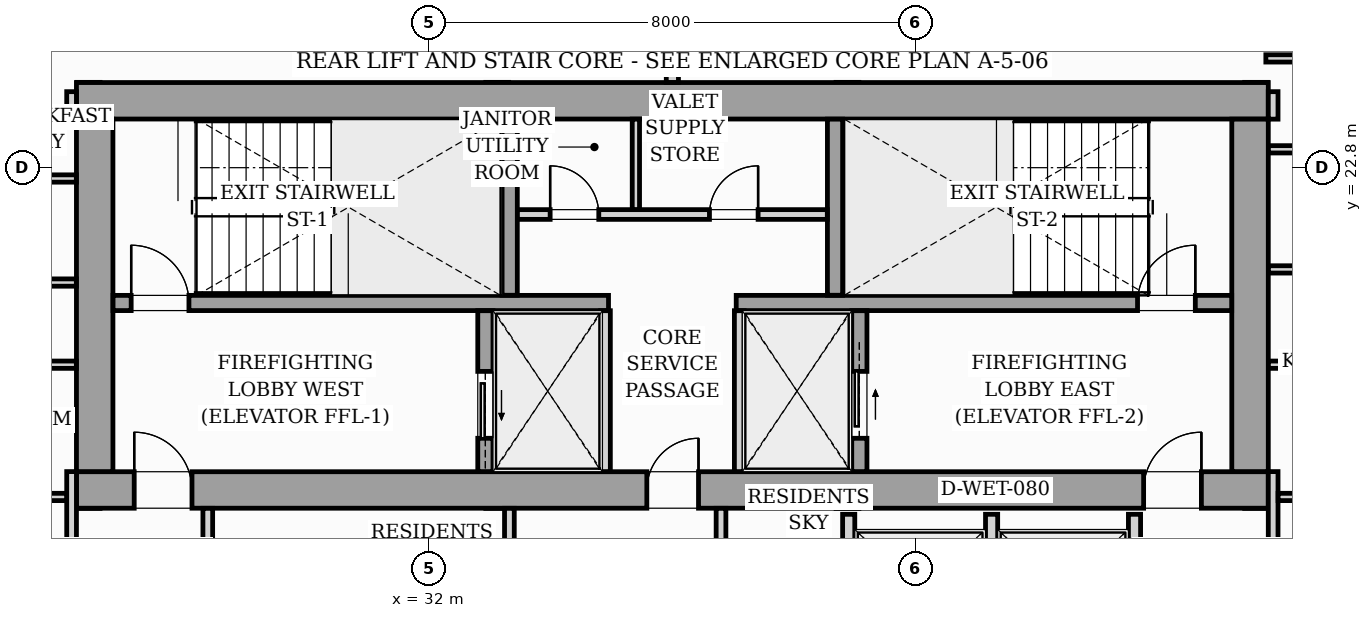
"""IFC4 building model, lengths in metres.
Left out: names, types, materials, properties, quantities, classifications, styles, units other than length and angle.
Written with IfcOpenShell. Run it as: python <this file> out.ifc"""

import sys

from ifc_helpers import new_model, si_unit, direction, frame, frame_2d, origin, origin_2d, place, context, subcontext, project, spatial, rectangle, i_section, extrude, source, transform, mapped, element, fill, save


model = new_model("IFC4")
c1 = context("Model", 3, precision=1e-05, world=origin(), true_north=direction((0.0, 1.0)))
c2 = subcontext(c1, "Body", "Model", "MODEL_VIEW")
j1 = project(units=[si_unit("LENGTHUNIT", "METRE"), si_unit("PLANEANGLEUNIT", "RADIAN")], contexts=[c1])
p1 = place(None, origin())
s1 = spatial("IfcSite", under=j1, at=p1, CompositionType="ELEMENT")
p2 = place(p1, origin())
s2 = spatial("IfcBuilding", under=s1, at=p2, CompositionType="ELEMENT")
p3 = place(p2, frame((0.0, 0.0, 195.4)))
s3 = spatial("IfcBuildingStorey", under=s2, at=p3, CompositionType="ELEMENT", Elevation=195.4)
m1 = source(origin(), c2, "Body", "SweptSolid", [
    extrude(i_section(OverallWidth=0.416, OverallDepth=0.446, WebThickness=0.039, FlangeThickness=0.063, FilletRadius=0.018, at=origin_2d()), origin(), (0.0, 0.0, 1.0), 3.196),
])
for number, where, z_axis, x_axis in (
    (1, (26.4, 17.4, 0.002), (0.0, 0.0, 1.0), (1.0, 0.0, 0.0)),
    (2, (33.12, 17.4, 0.002), (0.0, 0.0, 1.0), (1.0, 0.0, 0.0)),
    (3, (38.88, 17.4, 0.002), (0.0, 0.0, 1.0), (1.0, 0.0, 0.0)),
    (4, (45.6, 17.4, 0.002), (0.0, 0.0, 1.0), (1.0, 0.0, 0.0)),
    (5, (26.4, 24.0, 0.002), (0.0, 0.0, 1.0), (1.0, 0.0, 0.0)),
    (6, (33.12, 24.0, 0.002), (0.0, 0.0, 1.0), (1.0, 0.0, 0.0)),
    (7, (38.88, 24.0, 0.002), (0.0, 0.0, 1.0), (1.0, 0.0, 0.0)),
    (8, (45.6, 24.0, 0.002), (0.0, 0.0, 1.0), (1.0, 0.0, 0.0)),
):
    element("IfcColumn", number, at=place(p3, frame(where, z_axis=z_axis, x_axis=x_axis)), inside=s3, PredefinedType="PILASTER", context=c2, shape_type="MappedRepresentation", body=[
        mapped(m1, transform((0.0, 0.0, 0.0), scale=1.0)),
    ])
p4 = place(p3, frame((15.437, 24.324, 0.0), z_axis=(0.0, 0.0, 1.0), x_axis=(0.995395627913, 0.095851676732, 0.0)))
e9 = element("IfcWall", 9, at=p4, inside=s3, PredefinedType="STANDARD", context=c2, shape_type="SweptSolid", body=[
    extrude(rectangle(XDim=16.1, YDim=0.26, at=frame_2d((8.05, 0.0))), origin(), (0.0, 0.0, 1.0), 2.94),
])
p5 = place(p4, frame((6.147, 0.0, 0.0)))
e10 = element("IfcOpeningElement", 10, at=p5, cuts=e9, PredefinedType="OPENING", context=c2, shape_type="SweptSolid", body=[
    extrude(rectangle(XDim=1.8, YDim=2.06, at=frame_2d((0.9, 1.03))), frame((0.0, 0.14, 0.0), z_axis=(0.0, -1.0, 0.0), x_axis=(1.0, 0.0, 0.0)), (0.0, 0.0, 1.0), 0.28),
])
p6 = place(p4, frame((2.05, 0.0, 0.65)))
e11 = element("IfcOpeningElement", 11, at=p6, cuts=e9, PredefinedType="OPENING", context=c2, shape_type="SweptSolid", body=[
    extrude(rectangle(XDim=1.6, YDim=1.5, at=frame_2d((0.8, 0.75))), frame((0.0, 0.14, 0.0), z_axis=(0.0, -1.0, 0.0), x_axis=(1.0, 0.0, 0.0)), (0.0, 0.0, 1.0), 0.28),
])
p7 = place(p3, frame((26.2, 17.5, 0.0), z_axis=(0.0, 0.0, 1.0), x_axis=(1.0, 0.0, 0.0)))
e12 = element("IfcWall", 12, at=p7, inside=s3, PredefinedType="SHEAR", context=c2, shape_type="SweptSolid", body=[
    extrude(rectangle(XDim=19.6, YDim=0.6, at=frame_2d((9.8, 0.0))), origin(), (0.0, 0.0, 1.0), 3.2),
])
p8 = place(p7, frame((0.95, 0.0, 0.0)))
e13 = element("IfcOpeningElement", 13, at=p8, cuts=e12, PredefinedType="OPENING", context=c2, shape_type="SweptSolid", body=[
    extrude(rectangle(XDim=0.95, YDim=2.06, at=frame_2d((0.475, 1.03))), frame((0.0, 0.31, 0.0), z_axis=(0.0, -1.0, 0.0), x_axis=(1.0, 0.0, 0.0)), (0.0, 0.0, 1.0), 0.62),
])
p9 = place(p7, frame((9.38, 0.0, 0.0)))
e14 = element("IfcOpeningElement", 14, at=p9, cuts=e12, PredefinedType="OPENING", context=c2, shape_type="SweptSolid", body=[
    extrude(rectangle(XDim=0.85, YDim=2.0, at=frame_2d((0.425, 1.0))), frame((0.0, 0.31, 0.0), z_axis=(0.0, -1.0, 0.0), x_axis=(1.0, 0.0, 0.0)), (0.0, 0.0, 1.0), 0.62),
])
p10 = place(p7, frame((17.55, 0.0, 0.0)))
e15 = element("IfcOpeningElement", 15, at=p10, cuts=e12, PredefinedType="OPENING", context=c2, shape_type="SweptSolid", body=[
    extrude(rectangle(XDim=0.95, YDim=2.06, at=frame_2d((0.475, 1.03))), frame((0.0, 0.31, 0.0), z_axis=(0.0, -1.0, 0.0), x_axis=(1.0, 0.0, 0.0)), (0.0, 0.0, 1.0), 0.62),
])
p11 = place(p3, frame((26.2, 23.9, 0.0), z_axis=(0.0, 0.0, 1.0), x_axis=(1.0, 0.0, 0.0)))
e16 = element("IfcWall", 16, at=p11, inside=s3, PredefinedType="SHEAR", context=c2, shape_type="SweptSolid", body=[
    extrude(rectangle(XDim=19.6, YDim=0.6, at=frame_2d((9.8, 0.0))), origin(), (0.0, 0.0, 1.0), 3.2),
])
for number, where, z_axis, x_axis in (
    (17, (26.5, 17.802, 0.0), (0.0, 0.0, 1.0), (0.0, 1.0, 0.0)),
    (18, (45.5, 17.802, 0.0), (0.0, 0.0, 1.0), (0.0, 1.0, 0.0)),
):
    element("IfcWall", number, at=place(p3, frame(where, z_axis=z_axis, x_axis=x_axis)), inside=s3, PredefinedType="SHEAR", context=c2, shape_type="SweptSolid", body=[
        extrude(rectangle(XDim=5.796, YDim=0.6, at=frame_2d((2.898, 0.0))), origin(), (0.0, 0.0, 1.0), 3.2),
    ])
p12 = place(p3, frame((26.802, 20.575, 0.0), z_axis=(0.0, 0.0, 1.0), x_axis=(1.0, 0.0, 0.0)))
e19 = element("IfcWall", 19, at=p12, inside=s3, PredefinedType="SOLIDWALL", context=c2, shape_type="SweptSolid", body=[
    extrude(rectangle(XDim=8.148, YDim=0.25, at=frame_2d((4.074, 0.0))), origin(), (0.0, 0.0, 1.0), 3.2),
])
p13 = place(p12, frame((0.298, 0.0, 0.0)))
e20 = element("IfcOpeningElement", 20, at=p13, cuts=e19, PredefinedType="OPENING", context=c2, shape_type="SweptSolid", body=[
    extrude(rectangle(XDim=0.95, YDim=2.06, at=frame_2d((0.475, 1.03))), frame((0.0, 0.135, 0.0), z_axis=(0.0, -1.0, 0.0), x_axis=(1.0, 0.0, 0.0)), (0.0, 0.0, 1.0), 0.27),
])
p14 = place(p3, frame((37.05, 20.575, 0.0), z_axis=(0.0, 0.0, 1.0), x_axis=(1.0, 0.0, 0.0)))
e21 = element("IfcWall", 21, at=p14, inside=s3, PredefinedType="SOLIDWALL", context=c2, shape_type="SweptSolid", body=[
    extrude(rectangle(XDim=8.148, YDim=0.25, at=frame_2d((4.074, 0.0))), origin(), (0.0, 0.0, 1.0), 3.2),
])
p15 = place(p14, frame((6.6, 0.0, 0.0)))
e22 = element("IfcOpeningElement", 22, at=p15, cuts=e21, PredefinedType="OPENING", context=c2, shape_type="SweptSolid", body=[
    extrude(rectangle(XDim=0.95, YDim=2.06, at=frame_2d((0.475, 1.03))), frame((0.0, 0.135, 0.0), z_axis=(0.0, -1.0, 0.0), x_axis=(1.0, 0.0, 0.0)), (0.0, 0.0, 1.0), 0.27),
])
for number, where, z_axis, x_axis in (
    (23, (33.325, 20.702, 0.0), (0.0, 0.0, 1.0), (0.0, 1.0, 0.0)),
    (24, (38.675, 20.702, 0.0), (0.0, 0.0, 1.0), (0.0, 1.0, 0.0)),
):
    element("IfcWall", number, at=place(p3, frame(where, z_axis=z_axis, x_axis=x_axis)), inside=s3, PredefinedType="SOLIDWALL", context=c2, shape_type="SweptSolid", body=[
        extrude(rectangle(XDim=2.896, YDim=0.25, at=frame_2d((1.448, 0.0))), origin(), (0.0, 0.0, 1.0), 3.2),
    ])
p16 = place(p3, frame((32.925, 17.802, 0.0), z_axis=(0.0, 0.0, 1.0), x_axis=(0.0, 1.0, 0.0)))
e25 = element("IfcWall", 25, at=p16, inside=s3, PredefinedType="SOLIDWALL", context=c2, shape_type="SweptSolid", body=[
    extrude(rectangle(XDim=2.646, YDim=0.25, at=frame_2d((1.323, 0.0))), origin(), (0.0, 0.0, 1.0), 3.2),
])
p17 = place(p16, frame((0.548, 0.0, 0.0)))
e26 = element("IfcOpeningElement", 26, at=p17, cuts=e25, PredefinedType="OPENING", context=c2, shape_type="SweptSolid", body=[
    extrude(rectangle(XDim=1.1, YDim=2.08, at=frame_2d((0.55, 1.04))), frame((0.0, 0.135, 0.0), z_axis=(0.0, -1.0, 0.0), x_axis=(1.0, 0.0, 0.0)), (0.0, 0.0, 1.0), 0.27),
])
for number, where, z_axis, x_axis in (
    (27, (34.9, 17.802, 0.0), (0.0, 0.0, 1.0), (0.0, 1.0, 0.0)),
    (28, (37.1, 17.802, 0.0), (0.0, 0.0, 1.0), (0.0, 1.0, 0.0)),
):
    element("IfcWall", number, at=place(p3, frame(where, z_axis=z_axis, x_axis=x_axis)), inside=s3, PredefinedType="PARTITIONING", context=c2, shape_type="SweptSolid", body=[
        extrude(rectangle(XDim=2.646, YDim=0.16, at=frame_2d((1.323, 0.0))), origin(), (0.0, 0.0, 1.0), 2.94),
    ])
p18 = place(p3, frame((39.075, 17.802, 0.0), z_axis=(0.0, 0.0, 1.0), x_axis=(0.0, 1.0, 0.0)))
e29 = element("IfcWall", 29, at=p18, inside=s3, PredefinedType="SOLIDWALL", context=c2, shape_type="SweptSolid", body=[
    extrude(rectangle(XDim=2.646, YDim=0.25, at=frame_2d((1.323, 0.0))), origin(), (0.0, 0.0, 1.0), 3.2),
])
p19 = place(p18, frame((0.548, 0.0, 0.0)))
e30 = element("IfcOpeningElement", 30, at=p19, cuts=e29, PredefinedType="OPENING", context=c2, shape_type="SweptSolid", body=[
    extrude(rectangle(XDim=1.1, YDim=2.08, at=frame_2d((0.55, 1.04))), frame((0.0, 0.135, 0.0), z_axis=(0.0, -1.0, 0.0), x_axis=(1.0, 0.0, 0.0)), (0.0, 0.0, 1.0), 0.27),
])
p20 = place(p3, frame((33.452, 22.03, 0.0), z_axis=(0.0, 0.0, 1.0), x_axis=(1.0, 0.0, 0.0)))
e31 = element("IfcWall", 31, at=p20, inside=s3, PredefinedType="PARTITIONING", context=c2, shape_type="SweptSolid", body=[
    extrude(rectangle(XDim=5.096, YDim=0.16, at=frame_2d((2.548, 0.0))), origin(), (0.0, 0.0, 1.0), 2.94),
])
p21 = place(p20, frame((0.538, 0.0, 0.0)))
e32 = element("IfcOpeningElement", 32, at=p21, cuts=e31, PredefinedType="OPENING", context=c2, shape_type="SweptSolid", body=[
    extrude(rectangle(XDim=0.8, YDim=2.05, at=frame_2d((0.4, 1.025))), frame((0.0, 0.09, 0.0), z_axis=(0.0, -1.0, 0.0), x_axis=(1.0, 0.0, 0.0)), (0.0, 0.0, 1.0), 0.18),
])
p22 = place(p20, frame((3.158, 0.0, 0.0)))
e33 = element("IfcOpeningElement", 33, at=p22, cuts=e31, PredefinedType="OPENING", context=c2, shape_type="SweptSolid", body=[
    extrude(rectangle(XDim=0.8, YDim=2.05, at=frame_2d((0.4, 1.025))), frame((0.0, 0.09, 0.0), z_axis=(0.0, -1.0, 0.0), x_axis=(1.0, 0.0, 0.0)), (0.0, 0.0, 1.0), 0.18),
])
p23 = place(p3, frame((35.4, 22.112, 0.0), z_axis=(0.0, 0.0, 1.0), x_axis=(0.0, 1.0, 0.0)))
e34 = element("IfcWall", 34, at=p23, inside=s3, PredefinedType="PARTITIONING", context=c2, shape_type="SweptSolid", body=[
    extrude(rectangle(XDim=1.486, YDim=0.12, at=frame_2d((0.743, 0.0))), origin(), (0.0, 0.0, 1.0), 2.94),
])
for number, where, z_axis, x_axis in (
    (35, (38.9, 14.75, 0.0), (0.0, 0.0, 1.0), (0.0, 1.0, 0.0)),
    (36, (41.25, 14.75, 0.0), (0.0, 0.0, 1.0), (0.0, 1.0, 0.0)),
    (37, (43.6, 14.75, 0.0), (0.0, 0.0, 1.0), (0.0, 1.0, 0.0)),
):
    element("IfcWall", number, at=place(p3, frame(where, z_axis=z_axis, x_axis=x_axis)), inside=s3, PredefinedType="PARTITIONING", context=c2, shape_type="SweptSolid", body=[
        extrude(rectangle(XDim=2.35, YDim=0.2, at=frame_2d((1.175, 0.0))), origin(), (0.0, 0.0, 1.0), 2.94),
    ])
p24 = place(p3, frame((26.12, 13.442, 0.0), z_axis=(0.0, 0.0, 1.0), x_axis=(0.0, 1.0, 0.0)))
e38 = element("IfcWall", 38, at=p24, inside=s3, PredefinedType="PARTITIONING", context=c2, shape_type="SweptSolid", body=[
    extrude(rectangle(XDim=4.36, YDim=0.16, at=frame_2d((2.18, 0.0))), origin(), (0.0, 0.0, 1.0), 2.94),
])
p25 = place(p24, frame((0.493, 0.0, 0.0)))
e39 = element("IfcOpeningElement", 39, at=p25, cuts=e38, PredefinedType="OPENING", context=c2, shape_type="SweptSolid", body=[
    extrude(rectangle(XDim=0.95, YDim=2.06, at=frame_2d((0.475, 1.03))), frame((0.0, 0.09, 0.0), z_axis=(0.0, -1.0, 0.0), x_axis=(1.0, 0.0, 0.0)), (0.0, 0.0, 1.0), 0.18),
])
p26 = place(p3, frame((26.12, 23.598, 0.0), z_axis=(0.0, 0.0, 1.0), x_axis=(0.0, 1.0, 0.0)))
e40 = element("IfcWall", 40, at=p26, inside=s3, PredefinedType="PARTITIONING", context=c2, shape_type="SweptSolid", body=[
    extrude(rectangle(XDim=0.452, YDim=0.16, at=frame_2d((0.226, 0.0))), origin(), (0.0, 0.0, 1.0), 2.94),
])
p27 = place(p3, frame((45.88, 13.442, 0.0), z_axis=(0.0, 0.0, 1.0), x_axis=(0.0, 1.0, 0.0)))
e41 = element("IfcWall", 41, at=p27, inside=s3, PredefinedType="PARTITIONING", context=c2, shape_type="SweptSolid", body=[
    extrude(rectangle(XDim=4.36, YDim=0.16, at=frame_2d((2.18, 0.0))), origin(), (0.0, 0.0, 1.0), 2.94),
])
p28 = place(p27, frame((0.493, 0.0, 0.0)))
e42 = element("IfcOpeningElement", 42, at=p28, cuts=e41, PredefinedType="OPENING", context=c2, shape_type="SweptSolid", body=[
    extrude(rectangle(XDim=0.95, YDim=2.06, at=frame_2d((0.475, 1.03))), frame((0.0, 0.09, 0.0), z_axis=(0.0, -1.0, 0.0), x_axis=(1.0, 0.0, 0.0)), (0.0, 0.0, 1.0), 0.18),
])
p29 = place(p3, frame((45.88, 23.598, 0.0), z_axis=(0.0, 0.0, 1.0), x_axis=(0.0, 1.0, 0.0)))
e43 = element("IfcWall", 43, at=p29, inside=s3, PredefinedType="PARTITIONING", context=c2, shape_type="SweptSolid", body=[
    extrude(rectangle(XDim=0.452, YDim=0.16, at=frame_2d((0.226, 0.0))), origin(), (0.0, 0.0, 1.0), 2.94),
])
p30 = place(p3, frame((36.0, 24.202, 0.0), z_axis=(0.0, 0.0, 1.0), x_axis=(0.0, 1.0, 0.0)))
e44 = element("IfcWall", 44, at=p30, inside=s3, PredefinedType="PARTITIONING", context=c2, shape_type="SweptSolid", body=[
    extrude(rectangle(XDim=2.152, YDim=0.2, at=frame_2d((1.076, 0.0))), origin(), (0.0, 0.0, 1.0), 2.94),
])
p31 = place(p3, frame((23.782, 17.385, 0.0), z_axis=(0.0, 0.0, 1.0), x_axis=(1.0, 0.0, 0.0)))
e45 = element("IfcWall", 45, at=p31, inside=s3, PredefinedType="PARTITIONING", context=c2, shape_type="SweptSolid", body=[
    extrude(rectangle(XDim=2.256, YDim=0.12, at=frame_2d((1.128, 0.0))), origin(), (0.0, 0.0, 1.0), 2.281),
])
p32 = place(p3, frame((23.782, 19.56, 0.0), z_axis=(0.0, 0.0, 1.0), x_axis=(1.0, 0.0, 0.0)))
e46 = element("IfcWall", 46, at=p32, inside=s3, PredefinedType="PARTITIONING", context=c2, shape_type="SweptSolid", body=[
    extrude(rectangle(XDim=2.416, YDim=0.12, at=frame_2d((1.208, 0.0))), origin(), (0.0, 0.0, 1.0), 2.94),
])
p33 = place(p3, frame((14.608, 22.622, 0.0), z_axis=(0.0, 0.0, 1.0), x_axis=(1.0, 0.0, 0.0)))
e47 = element("IfcWall", 47, at=p33, inside=s3, PredefinedType="PARTITIONING", context=c2, shape_type="SweptSolid", body=[
    extrude(rectangle(XDim=11.59, YDim=0.12, at=frame_2d((5.795, 0.0))), origin(), (0.0, 0.0, 1.0), 2.94),
])
p34 = place(p33, frame((5.27, 0.0, 0.0)))
e48 = element("IfcOpeningElement", 48, at=p34, cuts=e47, PredefinedType="OPENING", context=c2, shape_type="SweptSolid", body=[
    extrude(rectangle(XDim=0.85, YDim=2.05, at=frame_2d((0.425, 1.025))), frame((0.0, 0.07, 0.0), z_axis=(0.0, -1.0, 0.0), x_axis=(1.0, 0.0, 0.0)), (0.0, 0.0, 1.0), 0.14),
])
p35 = place(p3, frame((13.334, 20.911, 0.0), z_axis=(0.0, 0.0, 1.0), x_axis=(1.0, 0.0, 0.0)))
e49 = element("IfcWall", 49, at=p35, inside=s3, PredefinedType="PARTITIONING", context=c2, shape_type="SweptSolid", body=[
    extrude(rectangle(XDim=12.864, YDim=0.12, at=frame_2d((6.432, 0.0))), origin(), (0.0, 0.0, 1.0), 2.94),
])
p36 = place(p35, frame((5.881, 0.0, 0.0)))
e50 = element("IfcOpeningElement", 50, at=p36, cuts=e49, PredefinedType="OPENING", context=c2, shape_type="SweptSolid", body=[
    extrude(rectangle(XDim=0.85, YDim=2.05, at=frame_2d((0.425, 1.025))), frame((0.0, 0.07, 0.0), z_axis=(0.0, -1.0, 0.0), x_axis=(1.0, 0.0, 0.0)), (0.0, 0.0, 1.0), 0.14),
])
p37 = place(p3, frame((45.962, 17.385, 0.0), z_axis=(0.0, 0.0, 1.0), x_axis=(1.0, 0.0, 0.0)))
e51 = element("IfcWall", 51, at=p37, inside=s3, PredefinedType="PARTITIONING", context=c2, shape_type="SweptSolid", body=[
    extrude(rectangle(XDim=2.256, YDim=0.12, at=frame_2d((1.128, 0.0))), origin(), (0.0, 0.0, 1.0), 2.281),
])
p38 = place(p3, frame((45.802, 19.56, 0.0), z_axis=(0.0, 0.0, 1.0), x_axis=(1.0, 0.0, 0.0)))
e52 = element("IfcWall", 52, at=p38, inside=s3, PredefinedType="PARTITIONING", context=c2, shape_type="SweptSolid", body=[
    extrude(rectangle(XDim=2.416, YDim=0.12, at=frame_2d((1.208, 0.0))), origin(), (0.0, 0.0, 1.0), 2.94),
])
p39 = place(p3, frame((45.76, 24.597, 0.0), z_axis=(0.0, 0.0, 1.0), x_axis=(1.0, 0.0, 0.0)))
e53 = element("IfcWall", 53, at=p39, inside=s3, PredefinedType="PARTITIONING", context=c2, shape_type="SweptSolid", body=[
    extrude(rectangle(XDim=18.294, YDim=0.12, at=frame_2d((9.147, 0.0))), origin(), (0.0, 0.0, 1.0), 2.94),
])
p40 = place(p39, frame((6.388, 0.0, 0.0)))
e54 = element("IfcOpeningElement", 54, at=p40, cuts=e53, PredefinedType="OPENING", context=c2, shape_type="SweptSolid", body=[
    extrude(rectangle(XDim=0.85, YDim=2.05, at=frame_2d((0.425, 1.025))), frame((0.0, 0.07, 0.0), z_axis=(0.0, -1.0, 0.0), x_axis=(1.0, 0.0, 0.0)), (0.0, 0.0, 1.0), 0.14),
])
p41 = place(p3, frame((45.802, 23.102, 0.0), z_axis=(0.0, 0.0, 1.0), x_axis=(1.0, 0.0, 0.0)))
e55 = element("IfcWall", 55, at=p41, inside=s3, PredefinedType="PARTITIONING", context=c2, shape_type="SweptSolid", body=[
    extrude(rectangle(XDim=18.396, YDim=0.12, at=frame_2d((9.198, 0.0))), origin(), (0.0, 0.0, 1.0), 2.94),
])
p42 = place(p41, frame((6.346, 0.0, 0.0)))
e56 = element("IfcOpeningElement", 56, at=p42, cuts=e55, PredefinedType="OPENING", context=c2, shape_type="SweptSolid", body=[
    extrude(rectangle(XDim=0.85, YDim=2.05, at=frame_2d((0.425, 1.025))), frame((0.0, 0.07, 0.0), z_axis=(0.0, -1.0, 0.0), x_axis=(1.0, 0.0, 0.0)), (0.0, 0.0, 1.0), 0.14),
])
p43 = place(p3, frame((45.802, 21.127, 0.0), z_axis=(0.0, 0.0, 1.0), x_axis=(1.0, 0.0, 0.0)))
e57 = element("IfcWall", 57, at=p43, inside=s3, PredefinedType="PARTITIONING", context=c2, shape_type="SweptSolid", body=[
    extrude(rectangle(XDim=18.586, YDim=0.12, at=frame_2d((9.293, 0.0))), origin(), (0.0, 0.0, 1.0), 2.94),
])
p44 = place(p43, frame((8.954, 0.0, 0.0)))
e58 = element("IfcOpeningElement", 58, at=p44, cuts=e57, PredefinedType="OPENING", context=c2, shape_type="SweptSolid", body=[
    extrude(rectangle(XDim=0.85, YDim=2.05, at=frame_2d((0.425, 1.025))), frame((0.0, 0.07, 0.0), z_axis=(0.0, -1.0, 0.0), x_axis=(1.0, 0.0, 0.0)), (0.0, 0.0, 1.0), 0.14),
])
for number, where, z_axis, x_axis in (
    (59, (28.36, 14.7, 0.0), (0.0, 0.0, 1.0), (0.0, 1.0, 0.0)),
    (60, (33.32, 14.7, 0.0), (0.0, 0.0, 1.0), (0.0, 1.0, 0.0)),
    (61, (36.8, 14.7, 0.0), (0.0, 0.0, 1.0), (0.0, 1.0, 0.0)),
):
    element("IfcWall", number, at=place(p3, frame(where, z_axis=z_axis, x_axis=x_axis)), inside=s3, PredefinedType="PARTITIONING", context=c2, shape_type="SweptSolid", body=[
        extrude(rectangle(XDim=2.498, YDim=0.16, at=frame_2d((1.249, 0.0))), origin(), (0.0, 0.0, 1.0), 2.94),
    ])
m2 = source(origin(), c2, "Body", "SweptSolid", [
    extrude(rectangle(XDim=0.95, YDim=2.06, at=frame_2d((0.475, 1.03))), frame((0.0, 0.025, 0.0), z_axis=(0.0, -1.0, 0.0), x_axis=(1.0, 0.0, 0.0)), (0.0, 0.0, 1.0), 0.05),
])
p45 = place(p8, origin())
e62 = element("IfcDoor", 62, at=p45, inside=s3, OperationType="SINGLE_SWING_LEFT", PredefinedType="DOOR", context=c2, shape_type="MappedRepresentation", body=[
    mapped(m2, transform((0.0, 0.0, 0.0), scale=1.0)),
])
fill(e13, e62)
m3 = source(origin(), c2, "Body", "SweptSolid", [
    extrude(rectangle(XDim=0.85, YDim=2.0, at=frame_2d((0.425, 1.0))), frame((0.0, 0.025, 0.0), z_axis=(0.0, -1.0, 0.0), x_axis=(1.0, 0.0, 0.0)), (0.0, 0.0, 1.0), 0.05),
])
p46 = place(p9, origin())
e63 = element("IfcDoor", 63, at=p46, inside=s3, OperationType="SINGLE_SWING_RIGHT", PredefinedType="DOOR", context=c2, shape_type="MappedRepresentation", body=[
    mapped(m3, transform((0.0, 0.0, 0.0), scale=1.0)),
])
fill(e14, e63)
p47 = place(p10, origin())
e64 = element("IfcDoor", 64, at=p47, inside=s3, OperationType="SINGLE_SWING_RIGHT", PredefinedType="DOOR", context=c2, shape_type="MappedRepresentation", body=[
    mapped(m2, transform((0.0, 0.0, 0.0), scale=1.0)),
])
fill(e15, e64)
p48 = place(p13, origin())
e65 = element("IfcDoor", 65, at=p48, inside=s3, OperationType="SINGLE_SWING_LEFT", PredefinedType="DOOR", context=c2, shape_type="MappedRepresentation", body=[
    mapped(m2, transform((0.0, 0.0, 0.0), scale=1.0)),
])
fill(e20, e65)
p49 = place(p15, origin())
e66 = element("IfcDoor", 66, at=p49, inside=s3, OperationType="SINGLE_SWING_RIGHT", PredefinedType="DOOR", context=c2, shape_type="MappedRepresentation", body=[
    mapped(m2, transform((0.0, 0.0, 0.0), scale=1.0)),
])
fill(e22, e66)
m4 = source(origin(), c2, "Body", "SweptSolid", [
    extrude(rectangle(XDim=1.1, YDim=2.08, at=frame_2d((0.55, 1.04))), frame((0.0, 0.025, 0.0), z_axis=(0.0, -1.0, 0.0), x_axis=(1.0, 0.0, 0.0)), (0.0, 0.0, 1.0), 0.05),
])
p50 = place(p17, origin())
e67 = element("IfcDoor", 67, at=p50, inside=s3, OperationType="SLIDING_TO_LEFT", PredefinedType="DOOR", context=c2, shape_type="MappedRepresentation", body=[
    mapped(m4, transform((0.0, 0.0, 0.0), scale=1.0)),
])
fill(e26, e67)
p51 = place(p19, origin())
e68 = element("IfcDoor", 68, at=p51, inside=s3, OperationType="SLIDING_TO_RIGHT", PredefinedType="DOOR", context=c2, shape_type="MappedRepresentation", body=[
    mapped(m4, transform((0.0, 0.0, 0.0), scale=1.0)),
])
fill(e30, e68)
m5 = source(origin(), c2, "Body", "SweptSolid", [
    extrude(rectangle(XDim=0.8, YDim=2.05, at=frame_2d((0.4, 1.025))), frame((0.0, 0.025, 0.0), z_axis=(0.0, -1.0, 0.0), x_axis=(1.0, 0.0, 0.0)), (0.0, 0.0, 1.0), 0.05),
])
p52 = place(p21, origin())
e69 = element("IfcDoor", 69, at=p52, inside=s3, OperationType="SINGLE_SWING_LEFT", PredefinedType="DOOR", context=c2, shape_type="MappedRepresentation", body=[
    mapped(m5, transform((0.0, 0.0, 0.0), scale=1.0)),
])
fill(e32, e69)
p53 = place(p22, origin())
e70 = element("IfcDoor", 70, at=p53, inside=s3, OperationType="SINGLE_SWING_RIGHT", PredefinedType="DOOR", context=c2, shape_type="MappedRepresentation", body=[
    mapped(m5, transform((0.0, 0.0, 0.0), scale=1.0)),
])
fill(e33, e70)
save(model, sys.argv[1])
